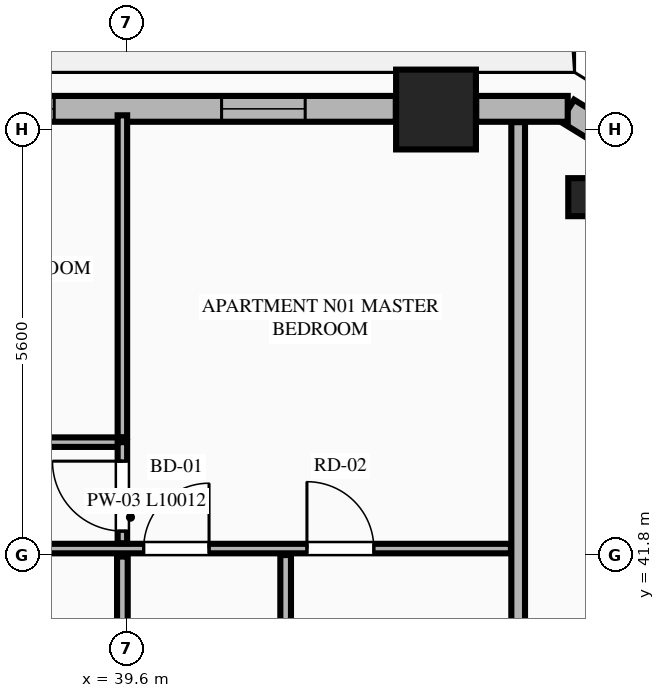
"""IFC4 building model, lengths in metres.
Left out: names, types, materials, properties, quantities, classifications, styles, units other than length and angle.
Written with IfcOpenShell. Run it as: python <this file> out.ifc"""

import sys

from ifc_helpers import new_model, si_unit, direction, frame, frame_2d, origin, origin_2d, place, context, subcontext, project, spatial, rectangle, extrude, element, fill, save


model = new_model("IFC4")
c1 = context("Model", 3, precision=1e-05, world=origin(), true_north=direction((0.0, 1.0)))
c2 = subcontext(c1, "Body", "Model", "MODEL_VIEW")
j1 = project(units=[si_unit("LENGTHUNIT", "METRE"), si_unit("PLANEANGLEUNIT", "RADIAN")], contexts=[c1])
p1 = place(None, origin())
s1 = spatial("IfcSite", under=j1, at=p1, CompositionType="ELEMENT")
p2 = place(p1, origin())
s2 = spatial("IfcBuilding", under=s1, at=p2, CompositionType="ELEMENT")
p3 = place(p2, frame((0.0, 0.0, 112.6)))
s3 = spatial("IfcBuildingStorey", under=s2, at=p3, CompositionType="ELEMENT", Elevation=112.6)
p4 = place(p3, frame((43.669, 47.661, 0.0), z_axis=(0.0, 0.0, 1.0), x_axis=(1.0, 0.0, 0.0)))
e1 = element("IfcColumn", 1, at=p4, inside=s3, PredefinedType="COLUMN", context=c2, shape_type="SweptSolid", body=[
    extrude(rectangle(XDim=1.05, YDim=1.05, at=origin_2d()), origin(), (0.0, 0.0, 1.0), 3.55),
])
p5 = place(p3, frame((45.659, 46.508, 0.0), z_axis=(0.0, 0.0, 1.0), x_axis=(-0.865160173452, 0.501495637342, 0.0)))
e2 = element("IfcColumn", 2, at=p5, inside=s3, PredefinedType="PILASTER", context=c2, shape_type="SweptSolid", body=[
    extrude(rectangle(XDim=0.5, YDim=0.35, at=origin_2d()), origin(), (0.0, 0.0, 1.0), 3.55),
])
p6 = place(p3, frame((46.971, 46.677, 0.0), z_axis=(0.0, 0.0, 1.0), x_axis=(-0.851798915137, 0.523868884523, 0.0)))
e3 = element("IfcWall", 3, at=p6, inside=s3, PredefinedType="STANDARD", context=c2, shape_type="SweptSolid", body=[
    extrude(rectangle(XDim=1.848, YDim=0.34, at=frame_2d((0.924, 0.0))), origin(), (0.0, 0.0, 1.0), 3.34),
])
p7 = place(p3, frame((45.402, 47.67, 0.0), z_axis=(0.0, 0.0, 1.0), x_axis=(-1.0, 0.0, 0.0)))
e4 = element("IfcWall", 4, at=p7, inside=s3, PredefinedType="STANDARD", context=c2, shape_type="SweptSolid", body=[
    extrude(rectangle(XDim=1.204, YDim=0.34, at=frame_2d((0.602, 0.0))), origin(), (0.0, 0.0, 1.0), 3.34),
])
p8 = place(p3, frame((43.14, 47.67, 0.0), z_axis=(0.0, 0.0, 1.0), x_axis=(-1.0, 0.0, 0.0)))
e5 = element("IfcWall", 5, at=p8, inside=s3, PredefinedType="STANDARD", context=c2, shape_type="SweptSolid", body=[
    extrude(rectangle(XDim=6.379, YDim=0.34, at=frame_2d((3.189, 0.0))), origin(), (0.0, 0.0, 1.0), 2.797),
])
p9 = place(p8, frame((1.192, 0.0, 0.75)))
e6 = element("IfcOpeningElement", 6, at=p9, cuts=e5, PredefinedType="OPENING", context=c2, shape_type="SweptSolid", body=[
    extrude(rectangle(XDim=1.1, YDim=1.897, at=frame_2d((0.55, 0.948))), frame((0.0, 0.18, 0.0), z_axis=(0.0, -1.0, 0.0), x_axis=(1.0, 0.0, 0.0)), (0.0, 0.0, 1.0), 0.36),
])
p10 = place(p8, frame((4.494, 0.0, 0.75)))
e7 = element("IfcOpeningElement", 7, at=p10, cuts=e5, PredefinedType="OPENING", context=c2, shape_type="SweptSolid", body=[
    extrude(rectangle(XDim=1.1, YDim=1.897, at=frame_2d((0.55, 0.948))), frame((0.0, 0.18, 0.0), z_axis=(0.0, -1.0, 0.0), x_axis=(1.0, 0.0, 0.0)), (0.0, 0.0, 1.0), 0.36),
])
p11 = place(p3, frame((44.75, 35.3, 0.0), z_axis=(0.0, 0.0, 1.0), x_axis=(0.0, 1.0, 0.0)))
e8 = element("IfcWall", 8, at=p11, inside=s3, PredefinedType="PARTITIONING", context=c2, shape_type="SweptSolid", body=[
    extrude(rectangle(XDim=12.195, YDim=0.18, at=frame_2d((6.098, 0.0))), origin(), (0.0, 0.0, 1.0), 3.34),
])
p12 = place(p3, frame((34.643, 41.885, 0.0), z_axis=(0.0, 0.0, 1.0), x_axis=(1.0, 0.0, 0.0)))
e9 = element("IfcWall", 9, at=p12, inside=s3, PredefinedType="PARTITIONING", context=c2, shape_type="SweptSolid", body=[
    extrude(rectangle(XDim=10.012, YDim=0.125, at=frame_2d((5.006, 0.0))), origin(), (0.0, 0.0, 1.0), 3.34),
])
p13 = place(p12, frame((5.18, 0.0, 0.0)))
e10 = element("IfcOpeningElement", 10, at=p13, cuts=e9, PredefinedType="OPENING", context=c2, shape_type="SweptSolid", body=[
    extrude(rectangle(XDim=0.86, YDim=2.1, at=frame_2d((0.43, 1.05))), frame((0.0, 0.073, 0.0), z_axis=(0.0, -1.0, 0.0), x_axis=(1.0, 0.0, 0.0)), (0.0, 0.0, 1.0), 0.145),
])
p14 = place(p12, frame((7.328, 0.0, 0.0)))
e11 = element("IfcOpeningElement", 11, at=p14, cuts=e9, PredefinedType="OPENING", context=c2, shape_type="SweptSolid", body=[
    extrude(rectangle(XDim=0.88, YDim=2.15, at=frame_2d((0.44, 1.075))), frame((0.0, 0.073, 0.0), z_axis=(0.0, -1.0, 0.0), x_axis=(1.0, 0.0, 0.0)), (0.0, 0.0, 1.0), 0.145),
])
p15 = place(p12, frame((0.3, 0.0, 0.0)))
e12 = element("IfcOpeningElement", 12, at=p15, cuts=e9, PredefinedType="OPENING", context=c2, shape_type="SweptSolid", body=[
    extrude(rectangle(XDim=0.88, YDim=2.15, at=frame_2d((0.44, 1.075))), frame((0.0, 0.073, 0.0), z_axis=(0.0, -1.0, 0.0), x_axis=(1.0, 0.0, 0.0)), (0.0, 0.0, 1.0), 0.145),
])
p16 = place(p3, frame((29.436, 43.285, 0.0), z_axis=(0.0, 0.0, 1.0), x_axis=(1.0, 0.0, 0.0)))
e13 = element("IfcWall", 13, at=p16, inside=s3, PredefinedType="PARTITIONING", context=c2, shape_type="SweptSolid", body=[
    extrude(rectangle(XDim=10.107, YDim=0.125, at=frame_2d((5.053, 0.0))), origin(), (0.0, 0.0, 1.0), 3.34),
])
p17 = place(p16, frame((0.35, 0.0, 0.0)))
e14 = element("IfcOpeningElement", 14, at=p17, cuts=e13, PredefinedType="OPENING", context=c2, shape_type="SweptSolid", body=[
    extrude(rectangle(XDim=0.92, YDim=2.15, at=frame_2d((0.46, 1.075))), frame((0.0, 0.073, 0.0), z_axis=(0.0, -1.0, 0.0), x_axis=(1.0, 0.0, 0.0)), (0.0, 0.0, 1.0), 0.145),
])
p18 = place(p16, frame((5.557, 0.0, 0.0)))
e15 = element("IfcOpeningElement", 15, at=p18, cuts=e13, PredefinedType="OPENING", context=c2, shape_type="SweptSolid", body=[
    extrude(rectangle(XDim=0.92, YDim=2.15, at=frame_2d((0.46, 1.075))), frame((0.0, 0.073, 0.0), z_axis=(0.0, -1.0, 0.0), x_axis=(1.0, 0.0, 0.0)), (0.0, 0.0, 1.0), 0.145),
])
p19 = place(p3, frame((39.543, 41.955, 0.0), z_axis=(0.0, 0.0, 1.0), x_axis=(0.0, 1.0, 0.0)))
e16 = element("IfcWall", 16, at=p19, inside=s3, PredefinedType="PARTITIONING", context=c2, shape_type="SweptSolid", body=[
    extrude(rectangle(XDim=1.33, YDim=0.125, at=frame_2d((0.665, 0.0))), origin(), (0.0, 0.0, 1.0), 3.34),
])
p20 = place(p19, frame((0.16, 0.0, 0.0)))
e17 = element("IfcOpeningElement", 17, at=p20, cuts=e16, PredefinedType="OPENING", context=c2, shape_type="SweptSolid", body=[
    extrude(rectangle(XDim=0.92, YDim=2.15, at=frame_2d((0.46, 1.075))), frame((0.0, 0.073, 0.0), z_axis=(0.0, -1.0, 0.0), x_axis=(1.0, 0.0, 0.0)), (0.0, 0.0, 1.0), 0.145),
])
p21 = place(p3, frame((39.543, 43.35, 0.0), z_axis=(0.0, 0.0, 1.0), x_axis=(0.0, 1.0, 0.0)))
e18 = element("IfcWall", 18, at=p21, inside=s3, PredefinedType="PARTITIONING", context=c2, shape_type="SweptSolid", body=[
    extrude(rectangle(XDim=4.235, YDim=0.125, at=frame_2d((2.117, 0.0))), origin(), (0.0, 0.0, 1.0), 3.34),
])
p22 = place(p3, frame((39.543, 35.385, 0.0), z_axis=(0.0, 0.0, 1.0), x_axis=(0.0, 1.0, 0.0)))
e19 = element("IfcWall", 19, at=p22, inside=s3, PredefinedType="PLUMBINGWALL", context=c2, shape_type="SweptSolid", body=[
    extrude(rectangle(XDim=6.395, YDim=0.14, at=frame_2d((3.198, 0.0))), origin(), (0.0, 0.0, 1.0), 3.34),
])
p23 = place(p3, frame((41.691, 35.385, 0.0), z_axis=(0.0, 0.0, 1.0), x_axis=(0.0, 1.0, 0.0)))
e20 = element("IfcWall", 20, at=p23, inside=s3, PredefinedType="PLUMBINGWALL", context=c2, shape_type="SweptSolid", body=[
    extrude(rectangle(XDim=6.415, YDim=0.14, at=frame_2d((3.208, 0.0))), origin(), (0.0, 0.0, 1.0), 2.722),
])
p24 = place(p9, origin())
e21 = element("IfcWindow", 21, at=p24, inside=s3, PartitioningType="SINGLE_PANEL", PredefinedType="WINDOW", context=c2, shape_type="SweptSolid", body=[
    extrude(rectangle(XDim=1.1, YDim=1.897, at=frame_2d((0.55, 0.948))), frame((0.0, 0.03, 0.0), z_axis=(0.0, -1.0, 0.0), x_axis=(1.0, 0.0, 0.0)), (0.0, 0.0, 1.0), 0.06),
])
fill(e6, e21)
p25 = place(p13, origin())
e22 = element("IfcDoor", 22, at=p25, inside=s3, OperationType="SINGLE_SWING_RIGHT", PredefinedType="DOOR", context=c2, shape_type="SweptSolid", body=[
    extrude(rectangle(XDim=0.86, YDim=2.1, at=frame_2d((0.43, 1.05))), frame((0.0, 0.025, 0.0), z_axis=(0.0, -1.0, 0.0), x_axis=(1.0, 0.0, 0.0)), (0.0, 0.0, 1.0), 0.05),
])
fill(e10, e22)
p26 = place(p14, origin())
e23 = element("IfcDoor", 23, at=p26, inside=s3, OperationType="SINGLE_SWING_LEFT", PredefinedType="DOOR", context=c2, shape_type="SweptSolid", body=[
    extrude(rectangle(XDim=0.88, YDim=2.15, at=frame_2d((0.44, 1.075))), frame((0.0, 0.025, 0.0), z_axis=(0.0, -1.0, 0.0), x_axis=(1.0, 0.0, 0.0)), (0.0, 0.0, 1.0), 0.05),
])
fill(e11, e23)
p27 = place(p20, origin())
e24 = element("IfcDoor", 24, at=p27, inside=s3, OperationType="SINGLE_SWING_RIGHT", PredefinedType="DOOR", context=c2, shape_type="SweptSolid", body=[
    extrude(rectangle(XDim=0.92, YDim=2.15, at=frame_2d((0.46, 1.075))), frame((0.0, 0.025, 0.0), z_axis=(0.0, -1.0, 0.0), x_axis=(1.0, 0.0, 0.0)), (0.0, 0.0, 1.0), 0.05),
])
fill(e17, e24)
p28 = place(p10, origin())
e25 = element("IfcWindow", 25, at=p28, inside=s3, PartitioningType="SINGLE_PANEL", PredefinedType="WINDOW", context=c2, shape_type="SweptSolid", body=[
    extrude(rectangle(XDim=1.1, YDim=1.897, at=frame_2d((0.55, 0.948))), frame((0.0, 0.03, 0.0), z_axis=(0.0, -1.0, 0.0), x_axis=(1.0, 0.0, 0.0)), (0.0, 0.0, 1.0), 0.06),
])
fill(e7, e25)
save(model, sys.argv[1])
